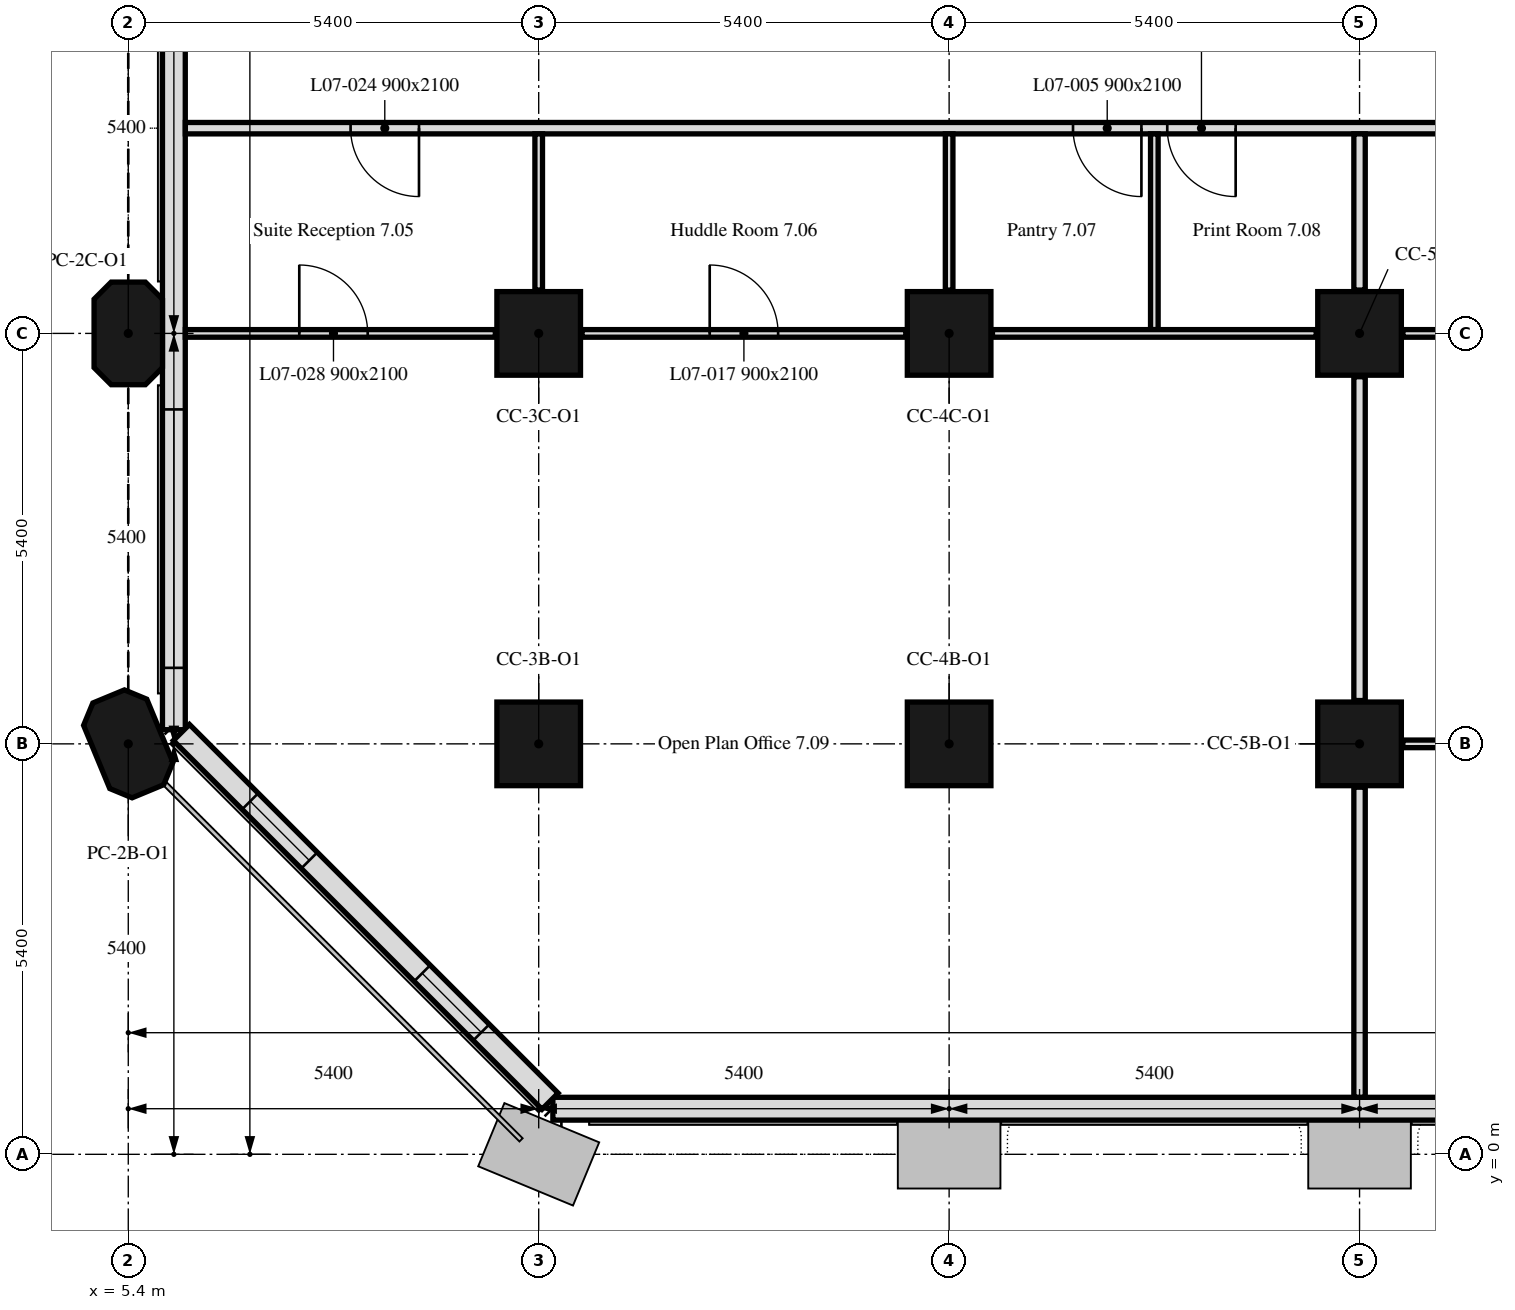
"""IFC4 building model, lengths in metres.
Left out: names, types, materials, properties, quantities, classifications, styles, units other than length and angle.
Written with IfcOpenShell. Run it as: python <this file> out.ifc"""

import sys

from ifc_helpers import new_model, si_unit, direction, frame, frame_2d, origin, origin_2d, place, context, subcontext, project, spatial, polyline, rectangle, outline, extrude, element, fill, save


model = new_model("IFC4")
c1 = context("Model", 3, precision=1e-05, world=origin(), true_north=direction((0.0, 1.0)))
c2 = subcontext(c1, "Body", "Model", "MODEL_VIEW")
j1 = project(units=[si_unit("LENGTHUNIT", "METRE"), si_unit("PLANEANGLEUNIT", "RADIAN")], contexts=[c1])
p1 = place(None, origin())
s1 = spatial("IfcSite", under=j1, at=p1, CompositionType="ELEMENT")
p2 = place(p1, origin())
s2 = spatial("IfcBuilding", under=s1, at=p2, CompositionType="ELEMENT")
p3 = place(p2, frame((0.0, 0.0, 37.4)))
s3 = spatial("IfcBuildingStorey", under=s2, at=p3, CompositionType="ELEMENT", Elevation=37.4)
p4 = place(p3, frame((5.4, 5.4, 0.0), z_axis=(0.0, 0.0, 1.0), x_axis=(-0.382683432365, 0.923879532511, 0.0)))
e1 = element("IfcColumn", 1, at=p4, inside=s3, PredefinedType="COLUMN", context=c2, shape_type="SweptSolid", body=[
    extrude(outline(polyline([(-0.45, -0.45), (0.45, -0.45), (0.675, -0.225), (0.675, 0.225), (0.45, 0.45), (-0.45, 0.45), (-0.675, 0.225), (-0.675, -0.225), (-0.45, -0.45)])), origin(), (0.0, 0.0, 1.0), 3.5),
])
for number, where, z_axis, x_axis in (
    (2, (10.8, 5.4, 0.0), (0.0, 0.0, 1.0), (1.0, 0.0, 0.0)),
    (3, (16.2, 5.4, 0.0), (0.0, 0.0, 1.0), (1.0, 0.0, 0.0)),
    (4, (21.6, 5.4, 0.0), (0.0, 0.0, 1.0), (1.0, 0.0, 0.0)),
):
    element("IfcColumn", number, at=place(p3, frame(where, z_axis=z_axis, x_axis=x_axis)), inside=s3, PredefinedType="COLUMN", context=c2, shape_type="SweptSolid", body=[
        extrude(rectangle(XDim=1.1, YDim=1.1, at=origin_2d()), origin(), (0.0, 0.0, 1.0), 3.5),
    ])
p5 = place(p3, frame((5.4, 10.8, 0.0), z_axis=(0.0, 0.0, 1.0), x_axis=(0.0, 1.0, 0.0)))
e5 = element("IfcColumn", 5, at=p5, inside=s3, PredefinedType="COLUMN", context=c2, shape_type="SweptSolid", body=[
    extrude(outline(polyline([(-0.45, -0.45), (0.45, -0.45), (0.675, -0.225), (0.675, 0.225), (0.45, 0.45), (-0.45, 0.45), (-0.675, 0.225), (-0.675, -0.225), (-0.45, -0.45)])), origin(), (0.0, 0.0, 1.0), 3.5),
])
for number, where, z_axis, x_axis in (
    (6, (10.8, 10.8, 0.0), (0.0, 0.0, 1.0), (1.0, 0.0, 0.0)),
    (7, (16.2, 10.8, 0.0), (0.0, 0.0, 1.0), (1.0, 0.0, 0.0)),
    (8, (21.6, 10.8, 0.0), (0.0, 0.0, 1.0), (1.0, 0.0, 0.0)),
):
    element("IfcColumn", number, at=place(p3, frame(where, z_axis=z_axis, x_axis=x_axis)), inside=s3, PredefinedType="COLUMN", context=c2, shape_type="SweptSolid", body=[
        extrude(rectangle(XDim=1.1, YDim=1.1, at=origin_2d()), origin(), (0.0, 0.0, 1.0), 3.5),
    ])
p6 = place(p3, frame((10.986, 0.6, 0.0), z_axis=(0.0, 0.0, 1.0), x_axis=(1.0, 0.0, 0.0)))
e9 = element("IfcWall", 9, at=p6, inside=s3, PredefinedType="SOLIDWALL", context=c2, shape_type="SweptSolid", body=[
    extrude(rectangle(XDim=32.027, YDim=0.3, at=frame_2d((16.014, 0.0))), origin(), (0.0, 0.0, 1.0), 3.5),
])
p7 = place(p6, frame((27.814, 0.0, 0.9)))
e10 = element("IfcOpeningElement", 10, at=p7, cuts=e9, PredefinedType="OPENING", context=c2, shape_type="SweptSolid", body=[
    extrude(rectangle(XDim=3.4, YDim=1.7, at=frame_2d((1.7, 0.85))), frame((0.0, 0.16, 0.0), z_axis=(0.0, -1.0, 0.0), x_axis=(1.0, 0.0, 0.0)), (0.0, 0.0, 1.0), 0.32),
])
p8 = place(p3, frame((6.0, 16.2, 0.0), z_axis=(0.0, 0.0, 1.0), x_axis=(0.0, -1.0, 0.0)))
e11 = element("IfcWall", 11, at=p8, inside=s3, PredefinedType="SOLIDWALL", context=c2, shape_type="SweptSolid", body=[
    extrude(rectangle(XDim=10.614, YDim=0.3, at=frame_2d((5.307, 0.0))), origin(), (0.0, 0.0, 1.0), 3.5),
])
p9 = place(p8, frame((6.4, 0.0, 0.9)))
e12 = element("IfcOpeningElement", 12, at=p9, cuts=e11, PredefinedType="OPENING", context=c2, shape_type="SweptSolid", body=[
    extrude(rectangle(XDim=3.4, YDim=1.7, at=frame_2d((1.7, 0.85))), frame((0.0, 0.16, 0.0), z_axis=(0.0, -1.0, 0.0), x_axis=(1.0, 0.0, 0.0)), (0.0, 0.0, 1.0), 0.32),
])
p10 = place(p3, frame((6.099, 5.55, 0.0), z_axis=(0.0, 0.0, 1.0), x_axis=(0.707106781187, -0.707106781187, 0.0)))
e13 = element("IfcWall", 13, at=p10, inside=s3, PredefinedType="SOLIDWALL", context=c2, shape_type="SweptSolid", body=[
    extrude(rectangle(XDim=6.86, YDim=0.3, at=frame_2d((3.43, 0.0))), origin(), (0.0, 0.0, 1.0), 3.5),
])
p11 = place(p10, frame((1.28, 0.0, 0.9)))
e14 = element("IfcOpeningElement", 14, at=p11, cuts=e13, PredefinedType="OPENING", context=c2, shape_type="SweptSolid", body=[
    extrude(rectangle(XDim=1.1, YDim=1.7, at=frame_2d((0.55, 0.85))), frame((0.0, 0.16, 0.0), z_axis=(0.0, -1.0, 0.0), x_axis=(1.0, 0.0, 0.0)), (0.0, 0.0, 1.0), 0.32),
])
p12 = place(p10, frame((4.48, 0.0, 0.9)))
e15 = element("IfcOpeningElement", 15, at=p12, cuts=e13, PredefinedType="OPENING", context=c2, shape_type="SweptSolid", body=[
    extrude(rectangle(XDim=1.1, YDim=1.7, at=frame_2d((0.55, 0.85))), frame((0.0, 0.16, 0.0), z_axis=(0.0, -1.0, 0.0), x_axis=(1.0, 0.0, 0.0)), (0.0, 0.0, 1.0), 0.32),
])
p13 = place(p3, frame((47.849, 13.5, 0.0), z_axis=(0.0, 0.0, 1.0), x_axis=(-1.0, 0.0, 0.0)))
e16 = element("IfcWall", 16, at=p13, inside=s3, PredefinedType="PARTITIONING", context=c2, shape_type="SweptSolid", body=[
    extrude(rectangle(XDim=41.698, YDim=0.15, at=frame_2d((20.849, 0.0))), origin(), (0.0, 0.0, 1.0), 2.75),
])
p14 = place(p13, frame((29.119, 0.0, 0.0)))
e17 = element("IfcOpeningElement", 17, at=p14, cuts=e16, PredefinedType="OPENING", context=c2, shape_type="SweptSolid", body=[
    extrude(rectangle(XDim=0.9, YDim=2.1, at=frame_2d((0.45, 1.05))), frame((0.0, 0.075, 0.0), z_axis=(0.0, -1.0, 0.0), x_axis=(1.0, 0.0, 0.0)), (0.0, 0.0, 1.0), 0.15),
])
p15 = place(p13, frame((27.879, 0.0, 0.0)))
e18 = element("IfcOpeningElement", 18, at=p15, cuts=e16, PredefinedType="OPENING", context=c2, shape_type="SweptSolid", body=[
    extrude(rectangle(XDim=0.9, YDim=2.1, at=frame_2d((0.45, 1.05))), frame((0.0, 0.075, 0.0), z_axis=(0.0, -1.0, 0.0), x_axis=(1.0, 0.0, 0.0)), (0.0, 0.0, 1.0), 0.15),
])
p16 = place(p13, frame((18.319, 0.0, 0.0)))
e19 = element("IfcOpeningElement", 19, at=p16, cuts=e16, PredefinedType="OPENING", context=c2, shape_type="SweptSolid", body=[
    extrude(rectangle(XDim=0.9, YDim=2.1, at=frame_2d((0.45, 1.05))), frame((0.0, 0.075, 0.0), z_axis=(0.0, -1.0, 0.0), x_axis=(1.0, 0.0, 0.0)), (0.0, 0.0, 1.0), 0.15),
])
p17 = place(p13, frame((11.679, 0.0, 0.0)))
e20 = element("IfcOpeningElement", 20, at=p17, cuts=e16, PredefinedType="OPENING", context=c2, shape_type="SweptSolid", body=[
    extrude(rectangle(XDim=0.9, YDim=2.1, at=frame_2d((0.45, 1.05))), frame((0.0, 0.075, 0.0), z_axis=(0.0, -1.0, 0.0), x_axis=(1.0, 0.0, 0.0)), (0.0, 0.0, 1.0), 0.15),
])
p18 = place(p13, frame((38.624, 0.0, 0.0)))
e21 = element("IfcOpeningElement", 21, at=p18, cuts=e16, PredefinedType="OPENING", context=c2, shape_type="SweptSolid", body=[
    extrude(rectangle(XDim=0.9, YDim=2.1, at=frame_2d((0.45, 1.05))), frame((0.0, 0.075, 0.0), z_axis=(0.0, -1.0, 0.0), x_axis=(1.0, 0.0, 0.0)), (0.0, 0.0, 1.0), 0.15),
])
p19 = place(p13, frame((23.099, 0.0, 0.0)))
e22 = element("IfcOpeningElement", 22, at=p19, cuts=e16, PredefinedType="OPENING", context=c2, shape_type="SweptSolid", body=[
    extrude(rectangle(XDim=0.9, YDim=2.1, at=frame_2d((0.45, 1.05))), frame((0.0, 0.075, 0.0), z_axis=(0.0, -1.0, 0.0), x_axis=(1.0, 0.0, 0.0)), (0.0, 0.0, 1.0), 0.15),
])
p20 = place(p13, frame((6.899, 0.0, 0.0)))
e23 = element("IfcOpeningElement", 23, at=p20, cuts=e16, PredefinedType="OPENING", context=c2, shape_type="SweptSolid", body=[
    extrude(rectangle(XDim=0.9, YDim=2.1, at=frame_2d((0.45, 1.05))), frame((0.0, 0.075, 0.0), z_axis=(0.0, -1.0, 0.0), x_axis=(1.0, 0.0, 0.0)), (0.0, 0.0, 1.0), 0.15),
])
p21 = place(p3, frame((6.151, 10.8, 0.0), z_axis=(0.0, 0.0, 1.0), x_axis=(1.0, 0.0, 0.0)))
e24 = element("IfcWall", 24, at=p21, inside=s3, PredefinedType="PARTITIONING", context=c2, shape_type="SweptSolid", body=[
    extrude(rectangle(XDim=4.079, YDim=0.1, at=frame_2d((2.04, 0.0))), origin(), (0.0, 0.0, 1.0), 3.5),
])
p22 = place(p21, frame((1.499, 0.0, 0.0)))
e25 = element("IfcOpeningElement", 25, at=p22, cuts=e24, PredefinedType="OPENING", context=c2, shape_type="SweptSolid", body=[
    extrude(rectangle(XDim=0.9, YDim=2.1, at=frame_2d((0.45, 1.05))), frame((0.0, 0.05, 0.0), z_axis=(0.0, -1.0, 0.0), x_axis=(1.0, 0.0, 0.0)), (0.0, 0.0, 1.0), 0.1),
])
p23 = place(p3, frame((10.8, 11.37, 0.0), z_axis=(0.0, 0.0, 1.0), x_axis=(0.0, 1.0, 0.0)))
e26 = element("IfcWall", 26, at=p23, inside=s3, PredefinedType="PARTITIONING", context=c2, shape_type="SweptSolid", body=[
    extrude(rectangle(XDim=2.055, YDim=0.1, at=frame_2d((1.027, 0.0))), origin(), (0.0, 0.0, 1.0), 3.5),
])
p24 = place(p3, frame((11.37, 10.8, 0.0), z_axis=(0.0, 0.0, 1.0), x_axis=(1.0, 0.0, 0.0)))
e27 = element("IfcWall", 27, at=p24, inside=s3, PredefinedType="PARTITIONING", context=c2, shape_type="SweptSolid", body=[
    extrude(rectangle(XDim=4.26, YDim=0.1, at=frame_2d((2.13, 0.0))), origin(), (0.0, 0.0, 1.0), 3.5),
])
p25 = place(p24, frame((1.68, 0.0, 0.0)))
e28 = element("IfcOpeningElement", 28, at=p25, cuts=e27, PredefinedType="OPENING", context=c2, shape_type="SweptSolid", body=[
    extrude(rectangle(XDim=0.9, YDim=2.1, at=frame_2d((0.45, 1.05))), frame((0.0, 0.05, 0.0), z_axis=(0.0, -1.0, 0.0), x_axis=(1.0, 0.0, 0.0)), (0.0, 0.0, 1.0), 0.1),
])
p26 = place(p3, frame((16.2, 11.37, 0.0), z_axis=(0.0, 0.0, 1.0), x_axis=(0.0, 1.0, 0.0)))
e29 = element("IfcWall", 29, at=p26, inside=s3, PredefinedType="PARTITIONING", context=c2, shape_type="SweptSolid", body=[
    extrude(rectangle(XDim=2.055, YDim=0.1, at=frame_2d((1.027, 0.0))), origin(), (0.0, 0.0, 1.0), 2.75),
])
p27 = place(p3, frame((18.9, 10.85, 0.0), z_axis=(0.0, 0.0, 1.0), x_axis=(0.0, 1.0, 0.0)))
e30 = element("IfcWall", 30, at=p27, inside=s3, PredefinedType="PARTITIONING", context=c2, shape_type="SweptSolid", body=[
    extrude(rectangle(XDim=2.575, YDim=0.1, at=frame_2d((1.288, 0.0))), origin(), (0.0, 0.0, 1.0), 3.5),
])
p28 = place(p3, frame((16.77, 10.8, 0.0), z_axis=(0.0, 0.0, 1.0), x_axis=(1.0, 0.0, 0.0)))
e31 = element("IfcWall", 31, at=p28, inside=s3, PredefinedType="PARTITIONING", context=c2, shape_type="SweptSolid", body=[
    extrude(rectangle(XDim=4.26, YDim=0.1, at=frame_2d((2.13, 0.0))), origin(), (0.0, 0.0, 1.0), 3.5),
])
p29 = place(p3, frame((21.6, 11.37, 0.0), z_axis=(0.0, 0.0, 1.0), x_axis=(0.0, 1.0, 0.0)))
e32 = element("IfcWall", 32, at=p29, inside=s3, PredefinedType="PARTITIONING", context=c2, shape_type="SweptSolid", body=[
    extrude(rectangle(XDim=2.055, YDim=0.15, at=frame_2d((1.027, 0.0))), origin(), (0.0, 0.0, 1.0), 2.75),
])
p30 = place(p3, frame((21.6, 10.23, 0.0), z_axis=(0.0, 0.0, 1.0), x_axis=(0.0, -1.0, 0.0)))
e33 = element("IfcWall", 33, at=p30, inside=s3, PredefinedType="PARTITIONING", context=c2, shape_type="SweptSolid", body=[
    extrude(rectangle(XDim=4.26, YDim=0.15, at=frame_2d((2.13, 0.0))), origin(), (0.0, 0.0, 1.0), 2.75),
])
p31 = place(p3, frame((21.6, 4.83, 0.0), z_axis=(0.0, 0.0, 1.0), x_axis=(0.0, -1.0, 0.0)))
e34 = element("IfcWall", 34, at=p31, inside=s3, PredefinedType="PARTITIONING", context=c2, shape_type="SweptSolid", body=[
    extrude(rectangle(XDim=4.079, YDim=0.15, at=frame_2d((2.04, 0.0))), origin(), (0.0, 0.0, 1.0), 2.75),
])
p32 = place(p3, frame((22.17, 10.8, 0.0), z_axis=(0.0, 0.0, 1.0), x_axis=(1.0, 0.0, 0.0)))
e35 = element("IfcWall", 35, at=p32, inside=s3, PredefinedType="PARTITIONING", context=c2, shape_type="SweptSolid", body=[
    extrude(rectangle(XDim=4.26, YDim=0.1, at=frame_2d((2.13, 0.0))), origin(), (0.0, 0.0, 1.0), 3.5),
])
p33 = place(p32, frame((1.68, 0.0, 0.0)))
e36 = element("IfcOpeningElement", 36, at=p33, cuts=e35, PredefinedType="OPENING", context=c2, shape_type="SweptSolid", body=[
    extrude(rectangle(XDim=0.9, YDim=2.1, at=frame_2d((0.45, 1.05))), frame((0.0, 0.05, 0.0), z_axis=(0.0, -1.0, 0.0), x_axis=(1.0, 0.0, 0.0)), (0.0, 0.0, 1.0), 0.1),
])
p34 = place(p3, frame((22.17, 5.4, 0.0), z_axis=(0.0, 0.0, 1.0), x_axis=(1.0, 0.0, 0.0)))
e37 = element("IfcWall", 37, at=p34, inside=s3, PredefinedType="PARTITIONING", context=c2, shape_type="SweptSolid", body=[
    extrude(rectangle(XDim=4.26, YDim=0.1, at=frame_2d((2.13, 0.0))), origin(), (0.0, 0.0, 1.0), 3.5),
])
p35 = place(p34, frame((1.68, 0.0, 0.0)))
e38 = element("IfcOpeningElement", 38, at=p35, cuts=e37, PredefinedType="OPENING", context=c2, shape_type="SweptSolid", body=[
    extrude(rectangle(XDim=0.9, YDim=2.1, at=frame_2d((0.45, 1.05))), frame((0.0, 0.05, 0.0), z_axis=(0.0, -1.0, 0.0), x_axis=(1.0, 0.0, 0.0)), (0.0, 0.0, 1.0), 0.1),
])
p36 = place(p9, origin())
e39 = element("IfcWindow", 39, at=p36, inside=s3, PartitioningType="SINGLE_PANEL", PredefinedType="WINDOW", context=c2, shape_type="SweptSolid", body=[
    extrude(rectangle(XDim=3.4, YDim=1.7, at=frame_2d((1.7, 0.85))), frame((0.0, 0.03, 0.0), z_axis=(0.0, -1.0, 0.0), x_axis=(1.0, 0.0, 0.0)), (0.0, 0.0, 1.0), 0.06),
])
fill(e12, e39)
p37 = place(p11, origin())
e40 = element("IfcWindow", 40, at=p37, inside=s3, PartitioningType="SINGLE_PANEL", PredefinedType="WINDOW", context=c2, shape_type="SweptSolid", body=[
    extrude(rectangle(XDim=1.1, YDim=1.7, at=frame_2d((0.55, 0.85))), frame((0.0, 0.03, 0.0), z_axis=(0.0, -1.0, 0.0), x_axis=(1.0, 0.0, 0.0)), (0.0, 0.0, 1.0), 0.06),
])
fill(e14, e40)
p38 = place(p12, origin())
e41 = element("IfcWindow", 41, at=p38, inside=s3, PartitioningType="SINGLE_PANEL", PredefinedType="WINDOW", context=c2, shape_type="SweptSolid", body=[
    extrude(rectangle(XDim=1.1, YDim=1.7, at=frame_2d((0.55, 0.85))), frame((0.0, 0.03, 0.0), z_axis=(0.0, -1.0, 0.0), x_axis=(1.0, 0.0, 0.0)), (0.0, 0.0, 1.0), 0.06),
])
fill(e15, e41)
p39 = place(p14, origin())
e42 = element("IfcDoor", 42, at=p39, inside=s3, OperationType="SINGLE_SWING_RIGHT", PredefinedType="DOOR", context=c2, shape_type="SweptSolid", body=[
    extrude(rectangle(XDim=0.9, YDim=2.1, at=frame_2d((0.45, 1.05))), frame((0.0, 0.025, 0.0), z_axis=(0.0, -1.0, 0.0), x_axis=(1.0, 0.0, 0.0)), (0.0, 0.0, 1.0), 0.05),
])
fill(e17, e42)
p40 = place(p15, origin())
e43 = element("IfcDoor", 43, at=p40, inside=s3, OperationType="SINGLE_SWING_RIGHT", PredefinedType="DOOR", context=c2, shape_type="SweptSolid", body=[
    extrude(rectangle(XDim=0.9, YDim=2.1, at=frame_2d((0.45, 1.05))), frame((0.0, 0.025, 0.0), z_axis=(0.0, -1.0, 0.0), x_axis=(1.0, 0.0, 0.0)), (0.0, 0.0, 1.0), 0.05),
])
fill(e18, e43)
p41 = place(p25, origin())
e44 = element("IfcDoor", 44, at=p41, inside=s3, OperationType="SINGLE_SWING_LEFT", PredefinedType="DOOR", context=c2, shape_type="SweptSolid", body=[
    extrude(rectangle(XDim=0.9, YDim=2.1, at=frame_2d((0.45, 1.05))), frame((0.0, 0.025, 0.0), z_axis=(0.0, -1.0, 0.0), x_axis=(1.0, 0.0, 0.0)), (0.0, 0.0, 1.0), 0.05),
])
fill(e28, e44)
p42 = place(p18, origin())
e45 = element("IfcDoor", 45, at=p42, inside=s3, OperationType="SINGLE_SWING_RIGHT", PredefinedType="DOOR", context=c2, shape_type="SweptSolid", body=[
    extrude(rectangle(XDim=0.9, YDim=2.1, at=frame_2d((0.45, 1.05))), frame((0.0, 0.025, 0.0), z_axis=(0.0, -1.0, 0.0), x_axis=(1.0, 0.0, 0.0)), (0.0, 0.0, 1.0), 0.05),
])
fill(e21, e45)
p43 = place(p22, origin())
e46 = element("IfcDoor", 46, at=p43, inside=s3, OperationType="SINGLE_SWING_RIGHT", PredefinedType="DOOR", context=c2, shape_type="SweptSolid", body=[
    extrude(rectangle(XDim=0.9, YDim=2.1, at=frame_2d((0.45, 1.05))), frame((0.0, 0.025, 0.0), z_axis=(0.0, -1.0, 0.0), x_axis=(1.0, 0.0, 0.0)), (0.0, 0.0, 1.0), 0.05),
])
fill(e25, e46)
save(model, sys.argv[1])
